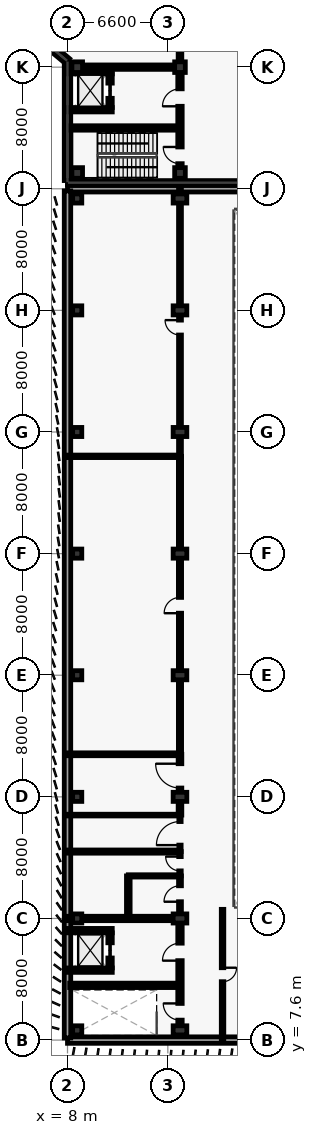
"""IFC4 building model, lengths in metres.
Left out: names, types, materials, properties, quantities, classifications, styles, units other than length and angle.
Written with IfcOpenShell. Run it as: python <this file> out.ifc"""

import sys

from ifc_helpers import new_model, si_unit, direction, frame, frame_2d, origin, origin_2d, place, context, subcontext, project, spatial, rectangle, extrude, element, fill, save


model = new_model("IFC4")
c1 = context("Model", 3, precision=1e-05, world=origin(), true_north=direction((0.0, 1.0)))
c2 = subcontext(c1, "Body", "Model", "MODEL_VIEW")
j1 = project(units=[si_unit("LENGTHUNIT", "METRE"), si_unit("PLANEANGLEUNIT", "RADIAN")], contexts=[c1])
p1 = place(None, origin())
s1 = spatial("IfcSite", under=j1, at=p1, CompositionType="ELEMENT")
p2 = place(p1, origin())
s2 = spatial("IfcBuilding", under=s1, at=p2, CompositionType="ELEMENT")
p3 = place(p2, frame((0.0, 0.0, 15.6)))
s3 = spatial("IfcBuildingStorey", under=s2, at=p3, CompositionType="ELEMENT", Elevation=15.6)
for number, where, z_axis, x_axis in (
    (1, (8.64, 8.24, 0.0), (0.0, 0.0, 1.0), (1.0, 0.0, 0.0)),
    (2, (8.64, 15.6, 0.0), (0.0, 0.0, 1.0), (1.0, 0.0, 0.0)),
    (3, (8.64, 23.6, 0.0), (0.0, 0.0, 1.0), (1.0, 0.0, 0.0)),
    (4, (8.64, 31.6, 0.0), (0.0, 0.0, 1.0), (1.0, 0.0, 0.0)),
    (5, (8.64, 39.6, 0.0), (0.0, 0.0, 1.0), (1.0, 0.0, 0.0)),
    (6, (8.64, 47.6, 0.0), (0.0, 0.0, 1.0), (1.0, 0.0, 0.0)),
    (7, (8.64, 55.6, 0.0), (0.0, 0.0, 1.0), (1.0, 0.0, 0.0)),
    (8, (8.64, 62.96, 0.0), (0.0, 0.0, 1.0), (1.0, 0.0, 0.0)),
):
    element("IfcColumn", number, at=place(p3, frame(where, z_axis=z_axis, x_axis=x_axis)), inside=s3, PredefinedType="COLUMN", context=c2, shape_type="SweptSolid", body=[
        extrude(rectangle(XDim=0.6, YDim=0.6, at=origin_2d()), origin(), (0.0, 0.0, 1.0), 4.8),
    ])
for number, where, z_axis, x_axis in (
    (9, (15.4, 8.24, 0.0), (0.0, 0.0, 1.0), (1.0, 0.0, 0.0)),
    (10, (15.4, 15.6, 0.0), (0.0, 0.0, 1.0), (1.0, 0.0, 0.0)),
    (11, (15.4, 23.6, 0.0), (0.0, 0.0, 1.0), (1.0, 0.0, 0.0)),
    (12, (15.4, 31.6, 0.0), (0.0, 0.0, 1.0), (1.0, 0.0, 0.0)),
    (13, (15.4, 39.6, 0.0), (0.0, 0.0, 1.0), (1.0, 0.0, 0.0)),
    (14, (15.4, 47.6, 0.0), (0.0, 0.0, 1.0), (1.0, 0.0, 0.0)),
    (15, (15.4, 55.6, 0.0), (0.0, 0.0, 1.0), (1.0, 0.0, 0.0)),
    (16, (15.4, 62.96, 0.0), (0.0, 0.0, 1.0), (1.0, 0.0, 0.0)),
):
    element("IfcColumn", number, at=place(p3, frame(where, z_axis=z_axis, x_axis=x_axis)), inside=s3, PredefinedType="COLUMN", context=c2, shape_type="SweptSolid", body=[
        extrude(rectangle(XDim=0.6, YDim=0.9, at=origin_2d()), origin(), (0.0, 0.0, 1.0), 4.8),
    ])
for number, where, z_axis, x_axis in (
    (17, (8.64, 64.64, 0.0), (0.0, 0.0, 1.0), (1.0, 0.0, 0.0)),
    (18, (8.64, 71.6, 0.0), (0.0, 0.0, 1.0), (1.0, 0.0, 0.0)),
    (19, (15.4, 64.64, 0.0), (0.0, 0.0, 1.0), (1.0, 0.0, 0.0)),
    (20, (15.4, 71.6, 0.0), (0.0, 0.0, 1.0), (1.0, 0.0, 0.0)),
):
    element("IfcColumn", number, at=place(p3, frame(where, z_axis=z_axis, x_axis=x_axis)), inside=s3, PredefinedType="COLUMN", context=c2, shape_type="SweptSolid", body=[
        extrude(rectangle(XDim=0.7, YDim=0.7, at=origin_2d()), origin(), (0.0, 0.0, 1.0), 4.8),
    ])
p4 = place(p3, frame((8.0, 63.6, 0.0), z_axis=(0.0, 0.0, 1.0), x_axis=(1.0, 0.0, 0.0)))
e21 = element("IfcWall", 21, at=p4, inside=s3, PredefinedType="SOLIDWALL", context=c2, shape_type="SweptSolid", body=[
    extrude(rectangle(XDim=38.0, YDim=0.425, at=frame_2d((19.0, 0.0))), origin(), (0.0, 0.0, 1.0), 4.555),
])
p5 = place(p3, frame((46.0, 7.6, 0.0), z_axis=(0.0, 0.0, 1.0), x_axis=(-1.0, 0.0, 0.0)))
e22 = element("IfcWall", 22, at=p5, inside=s3, PredefinedType="SOLIDWALL", context=c2, shape_type="SweptSolid", body=[
    extrude(rectangle(XDim=38.0, YDim=0.425, at=frame_2d((19.0, 0.0))), origin(), (0.0, 0.0, 1.0), 4.162),
])
p6 = place(p3, frame((8.0, 7.74, 0.0), z_axis=(0.0, 0.0, 1.0), x_axis=(0.0, 1.0, 0.0)))
e23 = element("IfcWall", 23, at=p6, inside=s3, PredefinedType="SOLIDWALL", context=c2, shape_type="SweptSolid", body=[
    extrude(rectangle(XDim=55.72, YDim=0.425, at=frame_2d((27.86, 0.0))), origin(), (0.0, 0.0, 1.0), 4.555),
])
p7 = place(p3, frame((8.0, 72.0, 0.0), z_axis=(0.0, 0.0, 1.0), x_axis=(-0.768208468069, 0.640199773186, 0.0)))
e24 = element("IfcWall", 24, at=p7, inside=s3, PredefinedType="SOLIDWALL", context=c2, shape_type="SweptSolid", body=[
    extrude(rectangle(XDim=3.124, YDim=0.425, at=frame_2d((1.562, 0.0))), origin(), (0.0, 0.0, 1.0), 4.55),
])
p8 = place(p3, frame((40.2, 64.0, 0.0), z_axis=(0.0, 0.0, 1.0), x_axis=(-1.0, 0.0, 0.0)))
e25 = element("IfcWall", 25, at=p8, inside=s3, PredefinedType="SOLIDWALL", context=c2, shape_type="SweptSolid", body=[
    extrude(rectangle(XDim=32.2, YDim=0.275, at=frame_2d((16.1, 0.0))), origin(), (0.0, 0.0, 1.0), 4.55),
])
p9 = place(p3, frame((8.0, 64.14, 0.0), z_axis=(0.0, 0.0, 1.0), x_axis=(0.0, 1.0, 0.0)))
e26 = element("IfcWall", 26, at=p9, inside=s3, PredefinedType="SOLIDWALL", context=c2, shape_type="SweptSolid", body=[
    extrude(rectangle(XDim=7.72, YDim=0.425, at=frame_2d((3.86, 0.0))), origin(), (0.0, 0.0, 1.0), 4.55),
])
p10 = place(p3, frame((7.855, 71.6, 0.0), z_axis=(0.0, 0.0, 1.0), x_axis=(1.0, 0.0, 0.0)))
e27 = element("IfcWall", 27, at=p10, inside=s3, PredefinedType="SHEAR", context=c2, shape_type="SweptSolid", body=[
    extrude(rectangle(XDim=7.193, YDim=0.29, at=frame_2d((3.597, 0.0))), origin(), (0.0, 0.0, 1.0), 4.55),
])
p11 = place(p3, frame((15.4, 64.145, 0.0), z_axis=(0.0, 0.0, 1.0), x_axis=(0.0, 1.0, 0.0)))
e28 = element("IfcWall", 28, at=p11, inside=s3, PredefinedType="SHEAR", context=c2, shape_type="SweptSolid", body=[
    extrude(rectangle(XDim=7.103, YDim=0.29, at=frame_2d((3.552, 0.0))), origin(), (0.0, 0.0, 1.0), 4.55),
])
p12 = place(p11, frame((1.105, 0.0, 0.0)))
e29 = element("IfcOpeningElement", 29, at=p12, cuts=e28, PredefinedType="OPENING", context=c2, shape_type="SweptSolid", body=[
    extrude(rectangle(XDim=1.1, YDim=2.15, at=frame_2d((0.55, 1.075))), frame((0.0, 0.155, 0.0), z_axis=(0.0, -1.0, 0.0), x_axis=(1.0, 0.0, 0.0)), (0.0, 0.0, 1.0), 0.31),
])
p13 = place(p11, frame((4.88, 0.0, 0.0)))
e30 = element("IfcOpeningElement", 30, at=p13, cuts=e28, PredefinedType="OPENING", context=c2, shape_type="SweptSolid", body=[
    extrude(rectangle(XDim=1.15, YDim=2.2, at=frame_2d((0.575, 1.1))), frame((0.0, 0.155, 0.0), z_axis=(0.0, -1.0, 0.0), x_axis=(1.0, 0.0, 0.0)), (0.0, 0.0, 1.0), 0.31),
])
p14 = place(p3, frame((8.145, 67.6, 0.0), z_axis=(0.0, 0.0, 1.0), x_axis=(1.0, 0.0, 0.0)))
e31 = element("IfcWall", 31, at=p14, inside=s3, PredefinedType="SHEAR", context=c2, shape_type="SweptSolid", body=[
    extrude(rectangle(XDim=7.11, YDim=0.29, at=frame_2d((3.555, 0.0))), origin(), (0.0, 0.0, 1.0), 4.55),
])
for number, where, z_axis, x_axis in (
    (32, (8.055, 68.8, 0.0), (0.0, 0.0, 1.0), (1.0, 0.0, 0.0)),
    (33, (8.055, 71.3, 0.0), (0.0, 0.0, 1.0), (1.0, 0.0, 0.0)),
):
    element("IfcWall", number, at=place(p3, frame(where, z_axis=z_axis, x_axis=x_axis)), inside=s3, PredefinedType="SHEAR", context=c2, shape_type="SweptSolid", body=[
        extrude(rectangle(XDim=2.89, YDim=0.29, at=frame_2d((1.445, 0.0))), origin(), (0.0, 0.0, 1.0), 4.55),
    ])
p15 = place(p3, frame((10.8, 68.945, 0.0), z_axis=(0.0, 0.0, 1.0), x_axis=(0.0, 1.0, 0.0)))
e34 = element("IfcWall", 34, at=p15, inside=s3, PredefinedType="SHEAR", context=c2, shape_type="SweptSolid", body=[
    extrude(rectangle(XDim=2.21, YDim=0.29, at=frame_2d((1.105, 0.0))), origin(), (0.0, 0.0, 1.0), 4.55),
])
p16 = place(p15, frame((0.605, 0.0, 0.0)))
e35 = element("IfcOpeningElement", 35, at=p16, cuts=e34, PredefinedType="OPENING", context=c2, shape_type="SweptSolid", body=[
    extrude(rectangle(XDim=1.0, YDim=2.15, at=frame_2d((0.5, 1.075))), frame((0.0, 0.155, 0.0), z_axis=(0.0, -1.0, 0.0), x_axis=(1.0, 0.0, 0.0)), (0.0, 0.0, 1.0), 0.31),
])
p17 = place(p3, frame((7.855, 15.6, 0.0), z_axis=(0.0, 0.0, 1.0), x_axis=(1.0, 0.0, 0.0)))
e36 = element("IfcWall", 36, at=p17, inside=s3, PredefinedType="SHEAR", context=c2, shape_type="SweptSolid", body=[
    extrude(rectangle(XDim=7.243, YDim=0.29, at=frame_2d((3.622, 0.0))), origin(), (0.0, 0.0, 1.0), 4.555),
])
p18 = place(p3, frame((15.4, 8.692, 0.0), z_axis=(0.0, 0.0, 1.0), x_axis=(0.0, 1.0, 0.0)))
e37 = element("IfcWall", 37, at=p18, inside=s3, PredefinedType="SHEAR", context=c2, shape_type="SweptSolid", body=[
    extrude(rectangle(XDim=6.456, YDim=0.29, at=frame_2d((3.228, 0.0))), origin(), (0.0, 0.0, 1.0), 4.555),
])
p19 = place(p18, frame((0.22, 0.0, 0.0)))
e38 = element("IfcOpeningElement", 38, at=p19, cuts=e37, PredefinedType="OPENING", context=c2, shape_type="SweptSolid", body=[
    extrude(rectangle(XDim=1.1, YDim=2.15, at=frame_2d((0.55, 1.075))), frame((0.0, 0.155, 0.0), z_axis=(0.0, -1.0, 0.0), x_axis=(1.0, 0.0, 0.0)), (0.0, 0.0, 1.0), 0.31),
])
p20 = place(p18, frame((4.133, 0.0, 0.0)))
e39 = element("IfcOpeningElement", 39, at=p20, cuts=e37, PredefinedType="OPENING", context=c2, shape_type="SweptSolid", body=[
    extrude(rectangle(XDim=1.15, YDim=2.2, at=frame_2d((0.575, 1.1))), frame((0.0, 0.155, 0.0), z_axis=(0.0, -1.0, 0.0), x_axis=(1.0, 0.0, 0.0)), (0.0, 0.0, 1.0), 0.31),
])
p21 = place(p3, frame((8.145, 11.2, 0.0), z_axis=(0.0, 0.0, 1.0), x_axis=(1.0, 0.0, 0.0)))
e40 = element("IfcWall", 40, at=p21, inside=s3, PredefinedType="SHEAR", context=c2, shape_type="SweptSolid", body=[
    extrude(rectangle(XDim=7.11, YDim=0.29, at=frame_2d((3.555, 0.0))), origin(), (0.0, 0.0, 1.0), 4.555),
])
for number, where, z_axis, x_axis in (
    (41, (8.055, 12.2, 0.0), (0.0, 0.0, 1.0), (1.0, 0.0, 0.0)),
    (42, (8.055, 14.8, 0.0), (0.0, 0.0, 1.0), (1.0, 0.0, 0.0)),
):
    element("IfcWall", number, at=place(p3, frame(where, z_axis=z_axis, x_axis=x_axis)), inside=s3, PredefinedType="SHEAR", context=c2, shape_type="SweptSolid", body=[
        extrude(rectangle(XDim=2.89, YDim=0.29, at=frame_2d((1.445, 0.0))), origin(), (0.0, 0.0, 1.0), 4.555),
    ])
p22 = place(p3, frame((10.8, 12.345, 0.0), z_axis=(0.0, 0.0, 1.0), x_axis=(0.0, 1.0, 0.0)))
e43 = element("IfcWall", 43, at=p22, inside=s3, PredefinedType="SHEAR", context=c2, shape_type="SweptSolid", body=[
    extrude(rectangle(XDim=2.31, YDim=0.29, at=frame_2d((1.155, 0.0))), origin(), (0.0, 0.0, 1.0), 4.555),
])
p23 = place(p22, frame((0.655, 0.0, 0.0)))
e44 = element("IfcOpeningElement", 44, at=p23, cuts=e43, PredefinedType="OPENING", context=c2, shape_type="SweptSolid", body=[
    extrude(rectangle(XDim=1.0, YDim=2.15, at=frame_2d((0.5, 1.075))), frame((0.0, 0.155, 0.0), z_axis=(0.0, -1.0, 0.0), x_axis=(1.0, 0.0, 0.0)), (0.0, 0.0, 1.0), 0.31),
])
p24 = place(p3, frame((15.4, 16.052, 0.0), z_axis=(0.0, 0.0, 1.0), x_axis=(0.0, 1.0, 0.0)))
e45 = element("IfcWall", 45, at=p24, inside=s3, PredefinedType="PARTITIONING", context=c2, shape_type="SweptSolid", body=[
    extrude(rectangle(XDim=2.348, YDim=0.19, at=frame_2d((1.174, 0.0))), origin(), (0.0, 0.0, 1.0), 2.732),
])
p25 = place(p24, frame((0.649, 0.0, 0.0)))
e46 = element("IfcOpeningElement", 46, at=p25, cuts=e45, PredefinedType="OPENING", context=c2, shape_type="SweptSolid", body=[
    extrude(rectangle(XDim=1.05, YDim=2.15, at=frame_2d((0.525, 1.075))), frame((0.0, 0.105, 0.0), z_axis=(0.0, -1.0, 0.0), x_axis=(1.0, 0.0, 0.0)), (0.0, 0.0, 1.0), 0.21),
])
p26 = place(p3, frame((15.4, 18.4, 0.0), z_axis=(0.0, 0.0, 1.0), x_axis=(0.0, 1.0, 0.0)))
e47 = element("IfcWall", 47, at=p26, inside=s3, PredefinedType="PARTITIONING", context=c2, shape_type="SweptSolid", body=[
    extrude(rectangle(XDim=1.6, YDim=0.165, at=frame_2d((0.8, 0.0))), origin(), (0.0, 0.0, 1.0), 2.732),
])
p27 = place(p26, frame((0.33, 0.0, 0.0)))
e48 = element("IfcOpeningElement", 48, at=p27, cuts=e47, PredefinedType="OPENING", context=c2, shape_type="SweptSolid", body=[
    extrude(rectangle(XDim=0.94, YDim=2.15, at=frame_2d((0.47, 1.075))), frame((0.0, 0.093, 0.0), z_axis=(0.0, -1.0, 0.0), x_axis=(1.0, 0.0, 0.0)), (0.0, 0.0, 1.0), 0.185),
])
p28 = place(p3, frame((15.4, 20.0, 0.0), z_axis=(0.0, 0.0, 1.0), x_axis=(0.0, 1.0, 0.0)))
e49 = element("IfcWall", 49, at=p28, inside=s3, PredefinedType="PARTITIONING", context=c2, shape_type="SweptSolid", body=[
    extrude(rectangle(XDim=2.4, YDim=0.15, at=frame_2d((1.2, 0.0))), origin(), (0.0, 0.0, 1.0), 2.732),
])
p29 = place(p28, frame((0.425, 0.0, 0.0)))
e50 = element("IfcOpeningElement", 50, at=p29, cuts=e49, PredefinedType="OPENING", context=c2, shape_type="SweptSolid", body=[
    extrude(rectangle(XDim=1.55, YDim=2.25, at=frame_2d((0.775, 1.125))), frame((0.0, 0.085, 0.0), z_axis=(0.0, -1.0, 0.0), x_axis=(1.0, 0.0, 0.0)), (0.0, 0.0, 1.0), 0.17),
])
p30 = place(p3, frame((15.4, 22.4, 0.0), z_axis=(0.0, 0.0, 1.0), x_axis=(0.0, 1.0, 0.0)))
e51 = element("IfcWall", 51, at=p30, inside=s3, PredefinedType="PARTITIONING", context=c2, shape_type="SweptSolid", body=[
    extrude(rectangle(XDim=4.0, YDim=0.24, at=frame_2d((2.0, 0.0))), origin(), (0.0, 0.0, 1.0), 2.732),
])
p31 = place(p30, frame((1.78, 0.0, 0.0)))
e52 = element("IfcOpeningElement", 52, at=p31, cuts=e51, PredefinedType="OPENING", context=c2, shape_type="SweptSolid", body=[
    extrude(rectangle(XDim=1.6, YDim=2.3, at=frame_2d((0.8, 1.15))), frame((0.0, 0.13, 0.0), z_axis=(0.0, -1.0, 0.0), x_axis=(1.0, 0.0, 0.0)), (0.0, 0.0, 1.0), 0.26),
])
p32 = place(p3, frame((15.4, 26.4, 0.0), z_axis=(0.0, 0.0, 1.0), x_axis=(0.0, 1.0, 0.0)))
e53 = element("IfcWall", 53, at=p32, inside=s3, PredefinedType="PARTITIONING", context=c2, shape_type="SweptSolid", body=[
    extrude(rectangle(XDim=19.6, YDim=0.21, at=frame_2d((9.8, 0.0))), origin(), (0.0, 0.0, 1.0), 2.732),
])
p33 = place(p32, frame((9.28, 0.0, 0.0)))
e54 = element("IfcOpeningElement", 54, at=p33, cuts=e53, PredefinedType="OPENING", context=c2, shape_type="SweptSolid", body=[
    extrude(rectangle(XDim=1.04, YDim=2.2, at=frame_2d((0.52, 1.1))), frame((0.0, 0.115, 0.0), z_axis=(0.0, -1.0, 0.0), x_axis=(1.0, 0.0, 0.0)), (0.0, 0.0, 1.0), 0.23),
])
p34 = place(p3, frame((15.4, 46.0, 0.0), z_axis=(0.0, 0.0, 1.0), x_axis=(0.0, 1.0, 0.0)))
e55 = element("IfcWall", 55, at=p34, inside=s3, PredefinedType="PARTITIONING", context=c2, shape_type="SweptSolid", body=[
    extrude(rectangle(XDim=17.6, YDim=0.19, at=frame_2d((8.8, 0.0))), origin(), (0.0, 0.0, 1.0), 2.732),
])
p35 = place(p34, frame((7.98, 0.0, 0.0)))
e56 = element("IfcOpeningElement", 56, at=p35, cuts=e55, PredefinedType="OPENING", context=c2, shape_type="SweptSolid", body=[
    extrude(rectangle(XDim=0.98, YDim=2.1, at=frame_2d((0.49, 1.05))), frame((0.0, 0.105, 0.0), z_axis=(0.0, -1.0, 0.0), x_axis=(1.0, 0.0, 0.0)), (0.0, 0.0, 1.0), 0.21),
])
p36 = place(p3, frame((18.2, 16.2, 0.0), z_axis=(0.0, 0.0, 1.0), x_axis=(0.0, -1.0, 0.0)))
e57 = element("IfcWall", 57, at=p36, inside=s3, PredefinedType="PARTITIONING", context=c2, shape_type="SweptSolid", body=[
    extrude(rectangle(XDim=8.6, YDim=0.165, at=frame_2d((4.3, 0.0))), origin(), (0.0, 0.0, 1.0), 4.555),
])
p37 = place(p36, frame((3.84, 0.0, 0.0)))
e58 = element("IfcOpeningElement", 58, at=p37, cuts=e57, PredefinedType="OPENING", context=c2, shape_type="SweptSolid", body=[
    extrude(rectangle(XDim=0.92, YDim=2.1, at=frame_2d((0.46, 1.05))), frame((0.0, 0.093, 0.0), z_axis=(0.0, -1.0, 0.0), x_axis=(1.0, 0.0, 0.0)), (0.0, 0.0, 1.0), 0.185),
])
p38 = place(p3, frame((12.0, 18.4, 0.0), z_axis=(0.0, 0.0, 1.0), x_axis=(1.0, 0.0, 0.0)))
e59 = element("IfcWall", 59, at=p38, inside=s3, PredefinedType="PARTITIONING", context=c2, shape_type="SweptSolid", body=[
    extrude(rectangle(XDim=3.4, YDim=0.15, at=frame_2d((1.7, 0.0))), origin(), (0.0, 0.0, 1.0), 4.555),
])
p39 = place(p3, frame((12.0, 15.6, 0.0), z_axis=(0.0, 0.0, 1.0), x_axis=(0.0, 1.0, 0.0)))
e60 = element("IfcWall", 60, at=p39, inside=s3, PredefinedType="PARTITIONING", context=c2, shape_type="SweptSolid", body=[
    extrude(rectangle(XDim=2.8, YDim=0.24, at=frame_2d((1.4, 0.0))), origin(), (0.0, 0.0, 1.0), 4.555),
])
p40 = place(p3, frame((8.0, 20.0, 0.0), z_axis=(0.0, 0.0, 1.0), x_axis=(1.0, 0.0, 0.0)))
e61 = element("IfcWall", 61, at=p40, inside=s3, PredefinedType="PARTITIONING", context=c2, shape_type="SweptSolid", body=[
    extrude(rectangle(XDim=7.4, YDim=0.21, at=frame_2d((3.7, 0.0))), origin(), (0.0, 0.0, 1.0), 4.555),
])
p41 = place(p3, frame((8.0, 22.4, 0.0), z_axis=(0.0, 0.0, 1.0), x_axis=(1.0, 0.0, 0.0)))
e62 = element("IfcWall", 62, at=p41, inside=s3, PredefinedType="PARTITIONING", context=c2, shape_type="SweptSolid", body=[
    extrude(rectangle(XDim=7.4, YDim=0.115, at=frame_2d((3.7, 0.0))), origin(), (0.0, 0.0, 1.0), 4.555),
])
p42 = place(p3, frame((8.0, 26.4, 0.0), z_axis=(0.0, 0.0, 1.0), x_axis=(1.0, 0.0, 0.0)))
e63 = element("IfcWall", 63, at=p42, inside=s3, PredefinedType="PARTITIONING", context=c2, shape_type="SweptSolid", body=[
    extrude(rectangle(XDim=7.4, YDim=0.19, at=frame_2d((3.7, 0.0))), origin(), (0.0, 0.0, 1.0), 4.555),
])
p43 = place(p3, frame((8.0, 46.0, 0.0), z_axis=(0.0, 0.0, 1.0), x_axis=(1.0, 0.0, 0.0)))
e64 = element("IfcWall", 64, at=p43, inside=s3, PredefinedType="PARTITIONING", context=c2, shape_type="SweptSolid", body=[
    extrude(rectangle(XDim=7.4, YDim=0.165, at=frame_2d((3.7, 0.0))), origin(), (0.0, 0.0, 1.0), 4.555),
])
p44 = place(p3, frame((15.4, 71.952, 0.0), z_axis=(0.0, 0.0, 1.0), x_axis=(0.0, 1.0, 0.0)))
e65 = element("IfcWall", 65, at=p44, inside=s3, PredefinedType="PARTITIONING", context=c2, shape_type="SweptSolid", body=[
    extrude(rectangle(XDim=7.296, YDim=0.24, at=frame_2d((3.648, 0.0))), origin(), (0.0, 0.0, 1.0), 3.7),
])
p45 = place(p44, frame((3.108, 0.0, 0.0)))
e66 = element("IfcOpeningElement", 66, at=p45, cuts=e65, PredefinedType="OPENING", context=c2, shape_type="SweptSolid", body=[
    extrude(rectangle(XDim=1.08, YDim=2.15, at=frame_2d((0.54, 1.075))), frame((0.0, 0.13, 0.0), z_axis=(0.0, -1.0, 0.0), x_axis=(1.0, 0.0, 0.0)), (0.0, 0.0, 1.0), 0.26),
])
p46 = place(p12, origin())
e67 = element("IfcDoor", 67, at=p46, inside=s3, OperationType="SINGLE_SWING_RIGHT", PredefinedType="DOOR", context=c2, shape_type="SweptSolid", body=[
    extrude(rectangle(XDim=1.1, YDim=2.15, at=frame_2d((0.55, 1.075))), frame((0.0, 0.025, 0.0), z_axis=(0.0, -1.0, 0.0), x_axis=(1.0, 0.0, 0.0)), (0.0, 0.0, 1.0), 0.05),
])
fill(e29, e67)
p47 = place(p13, origin())
e68 = element("IfcDoor", 68, at=p47, inside=s3, OperationType="SINGLE_SWING_LEFT", PredefinedType="DOOR", context=c2, shape_type="SweptSolid", body=[
    extrude(rectangle(XDim=1.15, YDim=2.2, at=frame_2d((0.575, 1.1))), frame((0.0, 0.025, 0.0), z_axis=(0.0, -1.0, 0.0), x_axis=(1.0, 0.0, 0.0)), (0.0, 0.0, 1.0), 0.05),
])
fill(e30, e68)
p48 = place(p16, origin())
e69 = element("IfcDoor", 69, at=p48, inside=s3, OperationType="SLIDING_TO_LEFT", PredefinedType="DOOR", context=c2, shape_type="SweptSolid", body=[
    extrude(rectangle(XDim=1.0, YDim=2.15, at=frame_2d((0.5, 1.075))), frame((0.0, 0.025, 0.0), z_axis=(0.0, -1.0, 0.0), x_axis=(1.0, 0.0, 0.0)), (0.0, 0.0, 1.0), 0.05),
])
fill(e35, e69)
p49 = place(p19, origin())
e70 = element("IfcDoor", 70, at=p49, inside=s3, OperationType="SINGLE_SWING_RIGHT", PredefinedType="DOOR", context=c2, shape_type="SweptSolid", body=[
    extrude(rectangle(XDim=1.1, YDim=2.15, at=frame_2d((0.55, 1.075))), frame((0.0, 0.025, 0.0), z_axis=(0.0, -1.0, 0.0), x_axis=(1.0, 0.0, 0.0)), (0.0, 0.0, 1.0), 0.05),
])
fill(e38, e70)
p50 = place(p20, origin())
e71 = element("IfcDoor", 71, at=p50, inside=s3, OperationType="SINGLE_SWING_LEFT", PredefinedType="DOOR", context=c2, shape_type="SweptSolid", body=[
    extrude(rectangle(XDim=1.15, YDim=2.2, at=frame_2d((0.575, 1.1))), frame((0.0, 0.025, 0.0), z_axis=(0.0, -1.0, 0.0), x_axis=(1.0, 0.0, 0.0)), (0.0, 0.0, 1.0), 0.05),
])
fill(e39, e71)
p51 = place(p23, origin())
e72 = element("IfcDoor", 72, at=p51, inside=s3, OperationType="SLIDING_TO_LEFT", PredefinedType="DOOR", context=c2, shape_type="SweptSolid", body=[
    extrude(rectangle(XDim=1.0, YDim=2.15, at=frame_2d((0.5, 1.075))), frame((0.0, 0.025, 0.0), z_axis=(0.0, -1.0, 0.0), x_axis=(1.0, 0.0, 0.0)), (0.0, 0.0, 1.0), 0.05),
])
fill(e44, e72)
p52 = place(p25, origin())
e73 = element("IfcDoor", 73, at=p52, inside=s3, OperationType="SINGLE_SWING_LEFT", PredefinedType="DOOR", context=c2, shape_type="SweptSolid", body=[
    extrude(rectangle(XDim=1.05, YDim=2.15, at=frame_2d((0.525, 1.075))), frame((0.0, 0.025, 0.0), z_axis=(0.0, -1.0, 0.0), x_axis=(1.0, 0.0, 0.0)), (0.0, 0.0, 1.0), 0.05),
])
fill(e46, e73)
p53 = place(p27, origin())
e74 = element("IfcDoor", 74, at=p53, inside=s3, OperationType="SINGLE_SWING_RIGHT", PredefinedType="DOOR", context=c2, shape_type="SweptSolid", body=[
    extrude(rectangle(XDim=0.94, YDim=2.15, at=frame_2d((0.47, 1.075))), frame((0.0, 0.025, 0.0), z_axis=(0.0, -1.0, 0.0), x_axis=(1.0, 0.0, 0.0)), (0.0, 0.0, 1.0), 0.05),
])
fill(e48, e74)
p54 = place(p29, origin())
e75 = element("IfcDoor", 75, at=p54, inside=s3, OperationType="SINGLE_SWING_LEFT", PredefinedType="DOOR", context=c2, shape_type="SweptSolid", body=[
    extrude(rectangle(XDim=1.55, YDim=2.25, at=frame_2d((0.775, 1.125))), frame((0.0, 0.025, 0.0), z_axis=(0.0, -1.0, 0.0), x_axis=(1.0, 0.0, 0.0)), (0.0, 0.0, 1.0), 0.05),
])
fill(e50, e75)
p55 = place(p31, origin())
e76 = element("IfcDoor", 76, at=p55, inside=s3, OperationType="SINGLE_SWING_RIGHT", PredefinedType="DOOR", context=c2, shape_type="SweptSolid", body=[
    extrude(rectangle(XDim=1.6, YDim=2.3, at=frame_2d((0.8, 1.15))), frame((0.0, 0.025, 0.0), z_axis=(0.0, -1.0, 0.0), x_axis=(1.0, 0.0, 0.0)), (0.0, 0.0, 1.0), 0.05),
])
fill(e52, e76)
p56 = place(p33, origin())
e77 = element("IfcDoor", 77, at=p56, inside=s3, OperationType="SINGLE_SWING_LEFT", PredefinedType="DOOR", context=c2, shape_type="SweptSolid", body=[
    extrude(rectangle(XDim=1.04, YDim=2.2, at=frame_2d((0.52, 1.1))), frame((0.0, 0.025, 0.0), z_axis=(0.0, -1.0, 0.0), x_axis=(1.0, 0.0, 0.0)), (0.0, 0.0, 1.0), 0.05),
])
fill(e54, e77)
p57 = place(p35, origin())
e78 = element("IfcDoor", 78, at=p57, inside=s3, OperationType="SINGLE_SWING_RIGHT", PredefinedType="DOOR", context=c2, shape_type="SweptSolid", body=[
    extrude(rectangle(XDim=0.98, YDim=2.1, at=frame_2d((0.49, 1.05))), frame((0.0, 0.025, 0.0), z_axis=(0.0, -1.0, 0.0), x_axis=(1.0, 0.0, 0.0)), (0.0, 0.0, 1.0), 0.05),
])
fill(e56, e78)
p58 = place(p37, origin())
e79 = element("IfcDoor", 79, at=p58, inside=s3, OperationType="SINGLE_SWING_LEFT", PredefinedType="DOOR", context=c2, shape_type="SweptSolid", body=[
    extrude(rectangle(XDim=0.92, YDim=2.1, at=frame_2d((0.46, 1.05))), frame((0.0, 0.025, 0.0), z_axis=(0.0, -1.0, 0.0), x_axis=(1.0, 0.0, 0.0)), (0.0, 0.0, 1.0), 0.05),
])
fill(e58, e79)
save(model, sys.argv[1])
